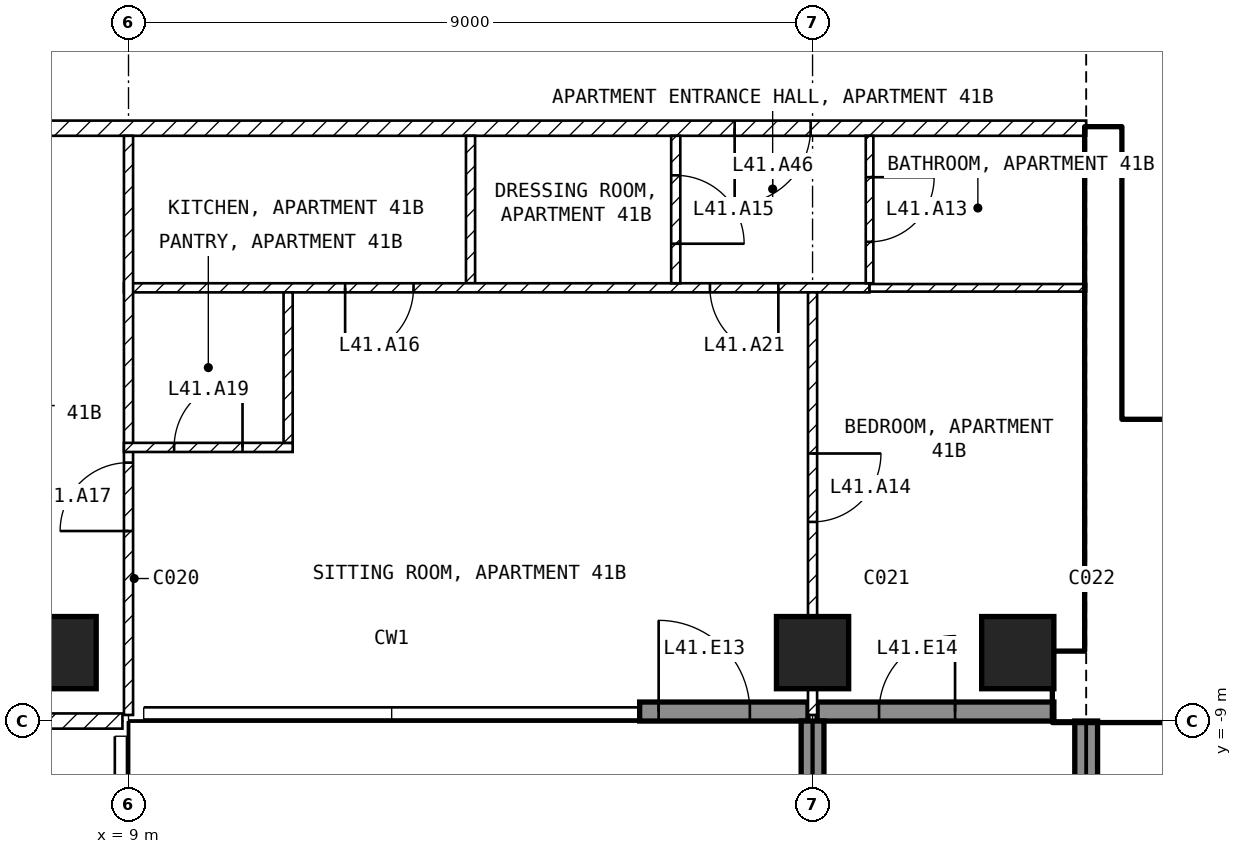
"""IFC4 building model, lengths in metres.
Left out: names, types, materials, properties, quantities, classifications, styles, units other than length and angle.
Written with IfcOpenShell. Run it as: python <this file> out.ifc"""

import sys

from ifc_helpers import new_model, si_unit, direction, frame, frame_2d, origin, origin_2d, place, context, subcontext, project, spatial, rectangle, extrude, element, fill, save


model = new_model("IFC4")
c1 = context("Model", 3, precision=1e-05, world=origin(), true_north=direction((0.0, 1.0)))
c2 = subcontext(c1, "Body", "Model", "MODEL_VIEW")
j1 = project(units=[si_unit("LENGTHUNIT", "METRE"), si_unit("PLANEANGLEUNIT", "RADIAN")], contexts=[c1])
p1 = place(None, origin())
s1 = spatial("IfcSite", under=j1, at=p1, CompositionType="ELEMENT")
p2 = place(p1, origin())
s2 = spatial("IfcBuilding", under=s1, at=p2, CompositionType="ELEMENT")
p3 = place(p2, frame((0.0, 0.0, 170.1)))
s3 = spatial("IfcBuildingStorey", under=s2, at=p3, CompositionType="ELEMENT", Elevation=170.1)
for number, where, z_axis, x_axis in (
    (1, (8.1, -8.1, -0.25), (0.0, 0.0, 1.0), (1.0, 0.0, 0.0)),
    (2, (18.0, -8.1, -0.25), (0.0, 0.0, 1.0), (1.0, 0.0, 0.0)),
    (3, (20.7, -8.1, -0.25), (0.0, 0.0, 1.0), (1.0, 0.0, 0.0)),
):
    element("IfcColumn", number, at=place(p3, frame(where, z_axis=z_axis, x_axis=x_axis)), inside=s3, PredefinedType="COLUMN", context=c2, shape_type="SweptSolid", body=[
        extrude(rectangle(XDim=0.95, YDim=0.95, at=origin_2d()), origin(), (0.0, 0.0, 1.0), 3.5),
    ])
p4 = place(p3, frame((15.725, -8.875, 0.0), z_axis=(0.0, 0.0, 1.0), x_axis=(1.0, 0.0, 0.0)))
e4 = element("IfcWall", 4, at=p4, inside=s3, PredefinedType="SOLIDWALL", context=c2, shape_type="SweptSolid", body=[
    extrude(rectangle(XDim=2.215, YDim=0.25, at=frame_2d((1.107, 0.0))), origin(), (0.0, 0.0, 1.0), 3.25),
])
p5 = place(p4, frame((0.25, 0.0, 0.0)))
e5 = element("IfcOpeningElement", 5, at=p5, cuts=e4, PredefinedType="OPENING", context=c2, shape_type="SweptSolid", body=[
    extrude(rectangle(XDim=1.2, YDim=2.4, at=frame_2d((0.6, 1.2))), frame((0.0, 0.135, 0.0), z_axis=(0.0, -1.0, 0.0), x_axis=(1.0, 0.0, 0.0)), (0.0, 0.0, 1.0), 0.27),
])
p6 = place(p3, frame((18.06, -8.875, 0.0), z_axis=(0.0, 0.0, 1.0), x_axis=(1.0, 0.0, 0.0)))
e6 = element("IfcWall", 6, at=p6, inside=s3, PredefinedType="SOLIDWALL", context=c2, shape_type="SweptSolid", body=[
    extrude(rectangle(XDim=3.115, YDim=0.25, at=frame_2d((1.558, 0.0))), origin(), (0.0, 0.0, 1.0), 3.25),
])
p7 = place(p6, frame((0.815, 0.0, 0.0)))
e7 = element("IfcOpeningElement", 7, at=p7, cuts=e6, PredefinedType="OPENING", context=c2, shape_type="SweptSolid", body=[
    extrude(rectangle(XDim=1.0, YDim=2.4, at=frame_2d((0.5, 1.2))), frame((0.0, 0.135, 0.0), z_axis=(0.0, -1.0, 0.0), x_axis=(1.0, 0.0, 0.0)), (0.0, 0.0, 1.0), 0.27),
])
for number, where, z_axis, x_axis in (
    (8, (18.0, -9.0, 0.0), (0.0, 0.0, 1.0), (0.0, -1.0, 0.0)),
    (9, (21.6, -9.0, 0.0), (0.0, 0.0, 1.0), (0.0, -1.0, 0.0)),
):
    element("IfcWall", number, at=place(p3, frame(where, z_axis=z_axis, x_axis=x_axis)), inside=s3, PredefinedType="SOLIDWALL", context=c2, shape_type="SweptSolid", body=[
        extrude(rectangle(XDim=2.7, YDim=0.3, at=frame_2d((1.35, 0.0))), origin(), (0.0, 0.0, 1.0), 3.25),
    ])
p8 = place(p3, frame((21.175, -8.55, 0.0), z_axis=(0.0, 0.0, 1.0), x_axis=(1.0, 0.0, 0.0)))
e10 = element("IfcWall", 10, at=p8, inside=s3, PredefinedType="SHEAR", context=c2, shape_type="SweptSolid", body=[
    extrude(rectangle(XDim=9.025, YDim=0.9, at=frame_2d((4.512, 0.0))), origin(), (0.0, 0.0, 1.0), 3.25),
])
p9 = place(p3, frame((21.825, -8.1, 0.0), z_axis=(0.0, 0.0, 1.0), x_axis=(0.0, 1.0, 0.0)))
e11 = element("IfcWall", 11, at=p9, inside=s3, PredefinedType="SHEAR", context=c2, shape_type="SweptSolid", body=[
    extrude(rectangle(XDim=6.9, YDim=0.45, at=frame_2d((3.45, 0.0))), origin(), (0.0, 0.0, 1.0), 3.25),
])
p10 = place(p3, frame((22.05, -5.15, 0.0), z_axis=(0.0, 0.0, 1.0), x_axis=(1.0, 0.0, 0.0)))
e12 = element("IfcWall", 12, at=p10, inside=s3, PredefinedType="SOLIDWALL", context=c2, shape_type="SweptSolid", body=[
    extrude(rectangle(XDim=6.3, YDim=0.2, at=frame_2d((3.15, 0.0))), origin(), (0.0, 0.0, 1.0), 3.25),
])
p11 = place(p10, frame((0.2, 0.0, 0.0)))
e13 = element("IfcOpeningElement", 13, at=p11, cuts=e12, PredefinedType="OPENING", context=c2, shape_type="SweptSolid", body=[
    extrude(rectangle(XDim=1.0, YDim=2.1, at=frame_2d((0.5, 1.05))), frame((0.0, 0.11, 0.0), z_axis=(0.0, -1.0, 0.0), x_axis=(1.0, 0.0, 0.0)), (0.0, 0.0, 1.0), 0.22),
])
p12 = place(p3, frame((21.6, -1.2, 0.0), z_axis=(0.0, 0.0, 1.0), x_axis=(-1.0, 0.0, 0.0)))
e14 = element("IfcWall", 14, at=p12, inside=s3, PredefinedType="PARTITIONING", context=c2, shape_type="SweptSolid", body=[
    extrude(rectangle(XDim=17.2, YDim=0.2, at=frame_2d((8.6, 0.0))), origin(), (0.0, 0.0, 1.0), 3.25),
])
p13 = place(p12, frame((3.625, 0.0, 0.0)))
e15 = element("IfcOpeningElement", 15, at=p13, cuts=e14, PredefinedType="OPENING", context=c2, shape_type="SweptSolid", body=[
    extrude(rectangle(XDim=1.0, YDim=2.1, at=frame_2d((0.5, 1.05))), frame((0.0, 0.11, 0.0), z_axis=(0.0, -1.0, 0.0), x_axis=(1.0, 0.0, 0.0)), (0.0, 0.0, 1.0), 0.22),
])
p14 = place(p3, frame((8.92, -9.0, 0.0), z_axis=(0.0, 0.0, 1.0), x_axis=(-1.0, 0.0, 0.0)))
e16 = element("IfcWall", 16, at=p14, inside=s3, PredefinedType="PARTITIONING", context=c2, shape_type="SweptSolid", body=[
    extrude(rectangle(XDim=17.84, YDim=0.2, at=frame_2d((8.92, 0.0))), origin(), (0.0, 0.0, 1.0), 3.25),
])
p15 = place(p14, frame((8.42, 0.0, 0.0)))
e17 = element("IfcOpeningElement", 17, at=p15, cuts=e16, PredefinedType="OPENING", context=c2, shape_type="SweptSolid", body=[
    extrude(rectangle(XDim=1.0, YDim=2.1, at=frame_2d((0.5, 1.05))), frame((0.0, 0.11, 0.0), z_axis=(0.0, -1.0, 0.0), x_axis=(1.0, 0.0, 0.0)), (0.0, 0.0, 1.0), 0.22),
])
p16 = place(p3, frame((13.5, -1.3, 0.0), z_axis=(0.0, 0.0, 1.0), x_axis=(0.0, -1.0, 0.0)))
e18 = element("IfcWall", 18, at=p16, inside=s3, PredefinedType="PARTITIONING", context=c2, shape_type="SweptSolid", body=[
    extrude(rectangle(XDim=1.94, YDim=0.12, at=frame_2d((0.97, 0.0))), origin(), (0.0, 0.0, 1.0), 3.25),
])
p17 = place(p3, frame((18.75, -3.3, 0.0), z_axis=(0.0, 0.0, 1.0), x_axis=(-1.0, 0.0, 0.0)))
e19 = element("IfcWall", 19, at=p17, inside=s3, PredefinedType="PARTITIONING", context=c2, shape_type="SweptSolid", body=[
    extrude(rectangle(XDim=9.81, YDim=0.12, at=frame_2d((4.905, 0.0))), origin(), (0.0, 0.0, 1.0), 3.25),
])
p18 = place(p17, frame((6.0, 0.0, 0.0)))
e20 = element("IfcOpeningElement", 20, at=p18, cuts=e19, PredefinedType="OPENING", context=c2, shape_type="SweptSolid", body=[
    extrude(rectangle(XDim=0.9, YDim=2.1, at=frame_2d((0.45, 1.05))), frame((0.0, 0.07, 0.0), z_axis=(0.0, -1.0, 0.0), x_axis=(1.0, 0.0, 0.0)), (0.0, 0.0, 1.0), 0.14),
])
p19 = place(p17, frame((1.2, 0.0, 0.0)))
e21 = element("IfcOpeningElement", 21, at=p19, cuts=e19, PredefinedType="OPENING", context=c2, shape_type="SweptSolid", body=[
    extrude(rectangle(XDim=0.9, YDim=2.1, at=frame_2d((0.45, 1.05))), frame((0.0, 0.07, 0.0), z_axis=(0.0, -1.0, 0.0), x_axis=(1.0, 0.0, 0.0)), (0.0, 0.0, 1.0), 0.14),
])
p20 = place(p3, frame((9.0, -8.92, 0.0), z_axis=(0.0, 0.0, 1.0), x_axis=(0.0, 1.0, 0.0)))
e22 = element("IfcWall", 22, at=p20, inside=s3, PredefinedType="PARTITIONING", context=c2, shape_type="SweptSolid", body=[
    extrude(rectangle(XDim=7.62, YDim=0.12, at=frame_2d((3.81, 0.0))), origin(), (0.0, 0.0, 1.0), 3.25),
])
p21 = place(p20, frame((2.42, 0.0, 0.0)))
e23 = element("IfcOpeningElement", 23, at=p21, cuts=e22, PredefinedType="OPENING", context=c2, shape_type="SweptSolid", body=[
    extrude(rectangle(XDim=0.9, YDim=2.1, at=frame_2d((0.45, 1.05))), frame((0.0, 0.07, 0.0), z_axis=(0.0, -1.0, 0.0), x_axis=(1.0, 0.0, 0.0)), (0.0, 0.0, 1.0), 0.14),
])
p22 = place(p3, frame((16.2, -1.3, 0.0), z_axis=(0.0, 0.0, 1.0), x_axis=(0.0, -1.0, 0.0)))
e24 = element("IfcWall", 24, at=p22, inside=s3, PredefinedType="PARTITIONING", context=c2, shape_type="SweptSolid", body=[
    extrude(rectangle(XDim=1.94, YDim=0.12, at=frame_2d((0.97, 0.0))), origin(), (0.0, 0.0, 1.0), 3.25),
])
p23 = place(p22, frame((0.52, 0.0, 0.0)))
e25 = element("IfcOpeningElement", 25, at=p23, cuts=e24, PredefinedType="OPENING", context=c2, shape_type="SweptSolid", body=[
    extrude(rectangle(XDim=0.9, YDim=2.1, at=frame_2d((0.45, 1.05))), frame((0.0, 0.07, 0.0), z_axis=(0.0, -1.0, 0.0), x_axis=(1.0, 0.0, 0.0)), (0.0, 0.0, 1.0), 0.14),
])
p24 = place(p3, frame((18.75, -1.3, 0.0), z_axis=(0.0, 0.0, 1.0), x_axis=(0.0, -1.0, 0.0)))
e26 = element("IfcWall", 26, at=p24, inside=s3, PredefinedType="PARTITIONING", context=c2, shape_type="SweptSolid", body=[
    extrude(rectangle(XDim=1.94, YDim=0.1, at=frame_2d((0.97, 0.0))), origin(), (0.0, 0.0, 1.0), 3.25),
])
p25 = place(p24, frame((0.545, 0.0, 0.0)))
e27 = element("IfcOpeningElement", 27, at=p25, cuts=e26, PredefinedType="OPENING", context=c2, shape_type="SweptSolid", body=[
    extrude(rectangle(XDim=0.85, YDim=2.1, at=frame_2d((0.425, 1.05))), frame((0.0, 0.06, 0.0), z_axis=(0.0, -1.0, 0.0), x_axis=(1.0, 0.0, 0.0)), (0.0, 0.0, 1.0), 0.12),
])
p26 = place(p3, frame((21.6, -3.3, 0.0), z_axis=(0.0, 0.0, 1.0), x_axis=(-1.0, 0.0, 0.0)))
e28 = element("IfcWall", 28, at=p26, inside=s3, PredefinedType="PARTITIONING", context=c2, shape_type="SweptSolid", body=[
    extrude(rectangle(XDim=2.85, YDim=0.1, at=frame_2d((1.425, 0.0))), origin(), (0.0, 0.0, 1.0), 3.25),
])
p27 = place(p3, frame((8.94, -5.4, 0.0), z_axis=(0.0, 0.0, 1.0), x_axis=(1.0, 0.0, 0.0)))
e29 = element("IfcWall", 29, at=p27, inside=s3, PredefinedType="PARTITIONING", context=c2, shape_type="SweptSolid", body=[
    extrude(rectangle(XDim=2.22, YDim=0.12, at=frame_2d((1.11, 0.0))), origin(), (0.0, 0.0, 1.0), 3.25),
])
p28 = place(p27, frame((0.66, 0.0, 0.0)))
e30 = element("IfcOpeningElement", 30, at=p28, cuts=e29, PredefinedType="OPENING", context=c2, shape_type="SweptSolid", body=[
    extrude(rectangle(XDim=0.9, YDim=2.1, at=frame_2d((0.45, 1.05))), frame((0.0, 0.07, 0.0), z_axis=(0.0, -1.0, 0.0), x_axis=(1.0, 0.0, 0.0)), (0.0, 0.0, 1.0), 0.14),
])
p29 = place(p3, frame((11.1, -5.34, 0.0), z_axis=(0.0, 0.0, 1.0), x_axis=(0.0, 1.0, 0.0)))
e31 = element("IfcWall", 31, at=p29, inside=s3, PredefinedType="PARTITIONING", context=c2, shape_type="SweptSolid", body=[
    extrude(rectangle(XDim=1.98, YDim=0.12, at=frame_2d((0.99, 0.0))), origin(), (0.0, 0.0, 1.0), 3.25),
])
p30 = place(p3, frame((18.0, -3.36, 0.0), z_axis=(0.0, 0.0, 1.0), x_axis=(0.0, -1.0, 0.0)))
e32 = element("IfcWall", 32, at=p30, inside=s3, PredefinedType="PARTITIONING", context=c2, shape_type="SweptSolid", body=[
    extrude(rectangle(XDim=5.56, YDim=0.12, at=frame_2d((2.78, 0.0))), origin(), (0.0, 0.0, 1.0), 2.48),
])
p31 = place(p30, frame((2.12, 0.0, 0.0)))
e33 = element("IfcOpeningElement", 33, at=p31, cuts=e32, PredefinedType="OPENING", context=c2, shape_type="SweptSolid", body=[
    extrude(rectangle(XDim=0.9, YDim=2.1, at=frame_2d((0.45, 1.05))), frame((0.0, 0.07, 0.0), z_axis=(0.0, -1.0, 0.0), x_axis=(1.0, 0.0, 0.0)), (0.0, 0.0, 1.0), 0.14),
])
p32 = place(p5, origin())
e34 = element("IfcDoor", 34, at=p32, inside=s3, OperationType="SINGLE_SWING_LEFT", PredefinedType="DOOR", context=c2, shape_type="SweptSolid", body=[
    extrude(rectangle(XDim=1.2, YDim=2.4, at=frame_2d((0.6, 1.2))), frame((0.0, 0.025, 0.0), z_axis=(0.0, -1.0, 0.0), x_axis=(1.0, 0.0, 0.0)), (0.0, 0.0, 1.0), 0.05),
])
fill(e5, e34)
p33 = place(p7, origin())
e35 = element("IfcDoor", 35, at=p33, inside=s3, OperationType="SINGLE_SWING_RIGHT", PredefinedType="DOOR", context=c2, shape_type="SweptSolid", body=[
    extrude(rectangle(XDim=1.0, YDim=2.4, at=frame_2d((0.5, 1.2))), frame((0.0, 0.025, 0.0), z_axis=(0.0, -1.0, 0.0), x_axis=(1.0, 0.0, 0.0)), (0.0, 0.0, 1.0), 0.05),
])
fill(e7, e35)
p34 = place(p11, origin())
e36 = element("IfcDoor", 36, at=p34, inside=s3, OperationType="SINGLE_SWING_LEFT", PredefinedType="DOOR", context=c2, shape_type="SweptSolid", body=[
    extrude(rectangle(XDim=1.0, YDim=2.1, at=frame_2d((0.5, 1.05))), frame((0.0, 0.025, 0.0), z_axis=(0.0, -1.0, 0.0), x_axis=(1.0, 0.0, 0.0)), (0.0, 0.0, 1.0), 0.05),
])
fill(e13, e36)
p35 = place(p25, origin())
e37 = element("IfcDoor", 37, at=p35, inside=s3, OperationType="SINGLE_SWING_LEFT", PredefinedType="DOOR", context=c2, shape_type="SweptSolid", body=[
    extrude(rectangle(XDim=0.85, YDim=2.1, at=frame_2d((0.425, 1.05))), frame((0.0, 0.025, 0.0), z_axis=(0.0, -1.0, 0.0), x_axis=(1.0, 0.0, 0.0)), (0.0, 0.0, 1.0), 0.05),
])
fill(e27, e37)
p36 = place(p31, origin())
e38 = element("IfcDoor", 38, at=p36, inside=s3, OperationType="SINGLE_SWING_LEFT", PredefinedType="DOOR", context=c2, shape_type="SweptSolid", body=[
    extrude(rectangle(XDim=0.9, YDim=2.1, at=frame_2d((0.45, 1.05))), frame((0.0, 0.025, 0.0), z_axis=(0.0, -1.0, 0.0), x_axis=(1.0, 0.0, 0.0)), (0.0, 0.0, 1.0), 0.05),
])
fill(e33, e38)
p37 = place(p23, origin())
e39 = element("IfcDoor", 39, at=p37, inside=s3, OperationType="SINGLE_SWING_RIGHT", PredefinedType="DOOR", context=c2, shape_type="SweptSolid", body=[
    extrude(rectangle(XDim=0.9, YDim=2.1, at=frame_2d((0.45, 1.05))), frame((0.0, 0.025, 0.0), z_axis=(0.0, -1.0, 0.0), x_axis=(1.0, 0.0, 0.0)), (0.0, 0.0, 1.0), 0.05),
])
fill(e25, e39)
p38 = place(p18, origin())
e40 = element("IfcDoor", 40, at=p38, inside=s3, OperationType="SINGLE_SWING_RIGHT", PredefinedType="DOOR", context=c2, shape_type="SweptSolid", body=[
    extrude(rectangle(XDim=0.9, YDim=2.1, at=frame_2d((0.45, 1.05))), frame((0.0, 0.025, 0.0), z_axis=(0.0, -1.0, 0.0), x_axis=(1.0, 0.0, 0.0)), (0.0, 0.0, 1.0), 0.05),
])
fill(e20, e40)
p39 = place(p21, origin())
e41 = element("IfcDoor", 41, at=p39, inside=s3, OperationType="SINGLE_SWING_LEFT", PredefinedType="DOOR", context=c2, shape_type="SweptSolid", body=[
    extrude(rectangle(XDim=0.9, YDim=2.1, at=frame_2d((0.45, 1.05))), frame((0.0, 0.025, 0.0), z_axis=(0.0, -1.0, 0.0), x_axis=(1.0, 0.0, 0.0)), (0.0, 0.0, 1.0), 0.05),
])
fill(e23, e41)
p40 = place(p28, origin())
e42 = element("IfcDoor", 42, at=p40, inside=s3, OperationType="SINGLE_SWING_RIGHT", PredefinedType="DOOR", context=c2, shape_type="SweptSolid", body=[
    extrude(rectangle(XDim=0.9, YDim=2.1, at=frame_2d((0.45, 1.05))), frame((0.0, 0.025, 0.0), z_axis=(0.0, -1.0, 0.0), x_axis=(1.0, 0.0, 0.0)), (0.0, 0.0, 1.0), 0.05),
])
fill(e30, e42)
p41 = place(p19, origin())
e43 = element("IfcDoor", 43, at=p41, inside=s3, OperationType="SINGLE_SWING_LEFT", PredefinedType="DOOR", context=c2, shape_type="SweptSolid", body=[
    extrude(rectangle(XDim=0.9, YDim=2.1, at=frame_2d((0.45, 1.05))), frame((0.0, 0.025, 0.0), z_axis=(0.0, -1.0, 0.0), x_axis=(1.0, 0.0, 0.0)), (0.0, 0.0, 1.0), 0.05),
])
fill(e21, e43)
p42 = place(p13, origin())
e44 = element("IfcDoor", 44, at=p42, inside=s3, OperationType="SINGLE_SWING_RIGHT", PredefinedType="DOOR", context=c2, shape_type="SweptSolid", body=[
    extrude(rectangle(XDim=1.0, YDim=2.1, at=frame_2d((0.5, 1.05))), frame((0.0, 0.025, 0.0), z_axis=(0.0, -1.0, 0.0), x_axis=(1.0, 0.0, 0.0)), (0.0, 0.0, 1.0), 0.05),
])
fill(e15, e44)
save(model, sys.argv[1])
